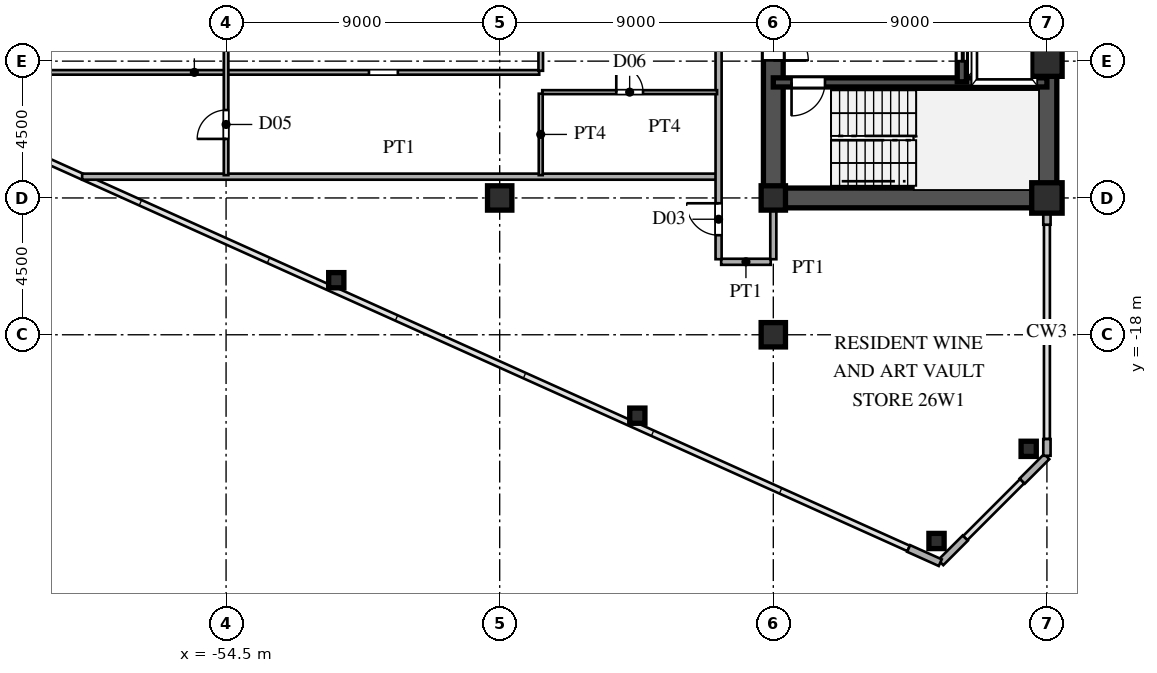
"""IFC4 building model, lengths in metres.
Left out: names, types, materials, properties, quantities, classifications, styles, units other than length and angle.
Written with IfcOpenShell. Run it as: python <this file> out.ifc"""

import sys

from ifc_helpers import new_model, si_unit, direction, frame, frame_2d, origin, origin_2d, place, context, subcontext, project, spatial, rectangle, hollow_rectangle, i_section, extrude, source, transform, mapped, element, fill, save


model = new_model("IFC4")
c1 = context("Model", 3, precision=1e-05, world=origin(), true_north=direction((0.0, 1.0)))
c2 = subcontext(c1, "Body", "Model", "MODEL_VIEW")
j1 = project(units=[si_unit("LENGTHUNIT", "METRE"), si_unit("PLANEANGLEUNIT", "RADIAN")], contexts=[c1])
p1 = place(None, origin())
s1 = spatial("IfcSite", under=j1, at=p1, CompositionType="ELEMENT")
p2 = place(p1, origin())
s2 = spatial("IfcBuilding", under=s1, at=p2, CompositionType="ELEMENT")
p3 = place(p2, frame((0.0, 0.0, 99.6)))
s3 = spatial("IfcBuildingStorey", under=s2, at=p3, CompositionType="ELEMENT", Elevation=99.6)
m1 = source(origin(), c2, "Body", "SweptSolid", [
    extrude(hollow_rectangle(XDim=1.0, YDim=1.0, WallThickness=0.042, at=origin_2d()), origin(), (0.0, 0.0, 1.0), 3.6),
])
for number, where, z_axis, x_axis in (
    (1, (-27.5, -13.5, 0.0), (0.0, 0.0, 1.0), (1.0, 0.0, 0.0)),
    (2, (-27.5, -9.0, 0.0), (0.0, 0.0, 1.0), (1.0, 0.0, 0.0)),
):
    element("IfcColumn", number, at=place(p3, frame(where, z_axis=z_axis, x_axis=x_axis)), inside=s3, PredefinedType="COLUMN", context=c2, shape_type="MappedRepresentation", body=[
        mapped(m1, transform((0.0, 0.0, 0.0), scale=1.0)),
    ])
m2 = source(origin(), c2, "Body", "SweptSolid", [
    extrude(i_section(OverallWidth=0.8, OverallDepth=0.8, WebThickness=0.032, FlangeThickness=0.05, at=origin_2d()), origin(), (0.0, 0.0, 1.0), 3.6),
])
for number, where, z_axis, x_axis in (
    (3, (-36.5, -18.0, 0.0), (0.0, 0.0, 1.0), (1.0, 0.0, 0.0)),
    (4, (-36.5, -13.5, 0.0), (0.0, 0.0, 1.0), (1.0, 0.0, 0.0)),
    (5, (-45.5, -13.5, 0.0), (0.0, 0.0, 1.0), (1.0, 0.0, 0.0)),
):
    element("IfcColumn", number, at=place(p3, frame(where, z_axis=z_axis, x_axis=x_axis)), inside=s3, PredefinedType="COLUMN", context=c2, shape_type="MappedRepresentation", body=[
        mapped(m2, transform((0.0, 0.0, 0.0), scale=1.0)),
    ])
m3 = source(origin(), c2, "Body", "SweptSolid", [
    extrude(hollow_rectangle(XDim=0.5, YDim=0.5, WallThickness=0.02, at=origin_2d()), origin(), (0.0, 0.0, 1.0), 3.6),
])
for number, where, z_axis, x_axis in (
    (6, (-28.1, -21.751, 0.0), (0.0, 0.0, 1.0), (1.0, 0.0, 0.0)),
    (7, (-31.131, -24.783, 0.0), (0.0, 0.0, 1.0), (1.0, 0.0, 0.0)),
    (8, (-40.973, -20.661, 0.0), (0.0, 0.0, 1.0), (1.0, 0.0, 0.0)),
    (9, (-50.875, -16.205, 0.0), (0.0, 0.0, 1.0), (1.0, 0.0, 0.0)),
):
    element("IfcColumn", number, at=place(p3, frame(where, z_axis=z_axis, x_axis=x_axis)), inside=s3, PredefinedType="COLUMN", context=c2, shape_type="MappedRepresentation", body=[
        mapped(m3, transform((0.0, 0.0, 0.0), scale=1.0)),
    ])
p4 = place(p3, frame((-27.5, -21.98, 0.0), z_axis=(0.0, 0.0, 1.0), x_axis=(0.0, 1.0, 0.0)))
e10 = element("IfcWall", 10, at=p4, inside=s3, PredefinedType="SOLIDWALL", context=c2, shape_type="SweptSolid", body=[
    extrude(rectangle(XDim=0.55, YDim=0.24, at=frame_2d((0.275, 0.0))), origin(), (0.0, 0.0, 1.0), 3.38),
])
p5 = place(p3, frame((-27.5, -14.38, 0.0), z_axis=(0.0, 0.0, 1.0), x_axis=(0.0, 1.0, 0.0)))
e11 = element("IfcWall", 11, at=p5, inside=s3, PredefinedType="SOLIDWALL", context=c2, shape_type="SweptSolid", body=[
    extrude(rectangle(XDim=0.55, YDim=0.24, at=frame_2d((0.275, 0.0))), origin(), (0.0, 0.0, 1.0), 2.88),
])
p6 = place(p3, frame((-32.049, -25.028, 0.0), z_axis=(0.0, 0.0, 1.0), x_axis=(0.911929519623, -0.410346866979, 0.0)))
e12 = element("IfcWall", 12, at=p6, inside=s3, PredefinedType="SOLIDWALL", context=c2, shape_type="SweptSolid", body=[
    extrude(rectangle(XDim=1.14, YDim=0.24, at=frame_2d((0.57, 0.0))), origin(), (0.0, 0.0, 1.0), 3.38),
])
for number, where, z_axis, x_axis in (
    (13, (-30.993, -25.493, 0.0), (0.0, 0.0, 1.0), (0.707, 0.707, 0.0)),
    (14, (-28.313, -22.813, 0.0), (0.0, 0.0, 1.0), (0.707, 0.707, 0.0)),
):
    element("IfcWall", number, at=place(p3, frame(where, z_axis=z_axis, x_axis=x_axis)), inside=s3, PredefinedType="SOLIDWALL", context=c2, shape_type="SweptSolid", body=[
        extrude(rectangle(XDim=1.14, YDim=0.24, at=frame_2d((0.57, 0.0))), origin(), (0.0, 0.0, 1.0), 3.38),
    ])
p7 = place(p3, frame((-27.5, -13.5, 0.0), z_axis=(0.0, 0.0, 1.0), x_axis=(0.0, 1.0, 0.0)))
e15 = element("IfcWall", 15, at=p7, inside=s3, PredefinedType="SHEAR", context=c2, shape_type="SweptSolid", body=[
    extrude(rectangle(XDim=12.2, YDim=0.65, at=frame_2d((6.1, 0.0))), origin(), (0.0, 0.0, 1.0), 3.38),
])
p8 = place(p3, frame((-36.5, -13.5, 0.0), z_axis=(0.0, 0.0, 1.0), x_axis=(1.0, 0.0, 0.0)))
e16 = element("IfcWall", 16, at=p8, inside=s3, PredefinedType="SHEAR", context=c2, shape_type="SweptSolid", body=[
    extrude(rectangle(XDim=9.0, YDim=0.65, at=frame_2d((4.5, 0.0))), origin(), (0.0, 0.0, 1.0), 3.38),
])
p9 = place(p3, frame((-36.5, -13.65, 0.0), z_axis=(0.0, 0.0, 1.0), x_axis=(0.0, 1.0, 0.0)))
e17 = element("IfcWall", 17, at=p9, inside=s3, PredefinedType="SHEAR", context=c2, shape_type="SweptSolid", body=[
    extrude(rectangle(XDim=7.15, YDim=0.65, at=frame_2d((3.575, 0.0))), origin(), (0.0, 0.0, 1.0), 3.38),
])
p10 = place(p9, frame((4.675, 0.0, 0.0)))
e18 = element("IfcOpeningElement", 18, at=p10, cuts=e17, PredefinedType="OPENING", context=c2, shape_type="SweptSolid", body=[
    extrude(rectangle(XDim=1.15, YDim=2.2, at=frame_2d((0.575, 1.1))), frame((0.0, 0.335, 0.0), z_axis=(0.0, -1.0, 0.0), x_axis=(1.0, 0.0, 0.0)), (0.0, 0.0, 1.0), 0.67),
])
p11 = place(p3, frame((-36.5, -9.7, 0.0), z_axis=(0.0, 0.0, 1.0), x_axis=(1.0, 0.0, 0.0)))
e19 = element("IfcWall", 19, at=p11, inside=s3, PredefinedType="SHEAR", context=c2, shape_type="SweptSolid", body=[
    extrude(rectangle(XDim=9.0, YDim=0.3, at=frame_2d((4.5, 0.0))), origin(), (0.0, 0.0, 1.0), 3.38),
])
p12 = place(p11, frame((0.6, 0.0, 0.0)))
e20 = element("IfcOpeningElement", 20, at=p12, cuts=e19, PredefinedType="OPENING", context=c2, shape_type="SweptSolid", body=[
    extrude(rectangle(XDim=1.1, YDim=2.2, at=frame_2d((0.55, 1.1))), frame((0.0, 0.16, 0.0), z_axis=(0.0, -1.0, 0.0), x_axis=(1.0, 0.0, 0.0)), (0.0, 0.0, 1.0), 0.32),
])
p13 = place(p3, frame((-30.3, -9.68, 0.0), z_axis=(0.0, 0.0, 1.0), x_axis=(0.0, 1.0, 0.0)))
e21 = element("IfcWall", 21, at=p13, inside=s3, PredefinedType="SHEAR", context=c2, shape_type="SweptSolid", body=[
    extrude(rectangle(XDim=2.56, YDim=0.3, at=frame_2d((1.28, 0.0))), origin(), (0.0, 0.0, 1.0), 3.38),
])
p14 = place(p13, frame((0.68, 0.0, 0.0)))
e22 = element("IfcOpeningElement", 22, at=p14, cuts=e21, PredefinedType="OPENING", context=c2, shape_type="SweptSolid", body=[
    extrude(rectangle(XDim=1.2, YDim=2.25, at=frame_2d((0.6, 1.125))), frame((0.0, 0.16, 0.0), z_axis=(0.0, -1.0, 0.0), x_axis=(1.0, 0.0, 0.0)), (0.0, 0.0, 1.0), 0.32),
])
p15 = place(p3, frame((-38.215, -15.6, 0.0), z_axis=(0.0, 0.0, 1.0), x_axis=(1.0, 0.0, 0.0)))
e23 = element("IfcWall", 23, at=p15, inside=s3, PredefinedType="PARTITIONING", context=c2, shape_type="SweptSolid", body=[
    extrude(rectangle(XDim=1.63, YDim=0.2, at=frame_2d((0.815, 0.0))), origin(), (0.0, 0.0, 1.0), 3.38),
])
p16 = place(p3, frame((-59.234, -12.8, 0.0), z_axis=(0.0, 0.0, 1.0), x_axis=(1.0, 0.0, 0.0)))
e24 = element("IfcWall", 24, at=p16, inside=s3, PredefinedType="PARTITIONING", context=c2, shape_type="SweptSolid", body=[
    extrude(rectangle(XDim=20.854, YDim=0.2, at=frame_2d((10.427, 0.0))), origin(), (0.0, 0.0, 1.0), 3.38),
])
p17 = place(p3, frame((-44.1, -10.02, 0.0), z_axis=(0.0, 0.0, 1.0), x_axis=(1.0, 0.0, 0.0)))
e25 = element("IfcWall", 25, at=p17, inside=s3, PredefinedType="PARTITIONING", context=c2, shape_type="SweptSolid", body=[
    extrude(rectangle(XDim=5.75, YDim=0.13, at=frame_2d((2.875, 0.0))), origin(), (0.0, 0.0, 1.0), 3.38),
])
p18 = place(p17, frame((2.435, 0.0, 0.0)))
e26 = element("IfcOpeningElement", 26, at=p18, cuts=e25, PredefinedType="OPENING", context=c2, shape_type="SweptSolid", body=[
    extrude(rectangle(XDim=0.88, YDim=2.1, at=frame_2d((0.44, 1.05))), frame((0.0, 0.075, 0.0), z_axis=(0.0, -1.0, 0.0), x_axis=(1.0, 0.0, 0.0)), (0.0, 0.0, 1.0), 0.15),
])
p19 = place(p3, frame((-66.887, -9.37, 0.0), z_axis=(0.0, 0.0, 1.0), x_axis=(1.0, 0.0, 0.0)))
e27 = element("IfcWall", 27, at=p19, inside=s3, PredefinedType="PARTITIONING", context=c2, shape_type="SweptSolid", body=[
    extrude(rectangle(XDim=22.687, YDim=0.15, at=frame_2d((11.344, 0.0))), origin(), (0.0, 0.0, 1.0), 3.38),
])
p20 = place(p19, frame((17.087, 0.0, 0.0)))
e28 = element("IfcOpeningElement", 28, at=p20, cuts=e27, PredefinedType="OPENING", context=c2, shape_type="SweptSolid", body=[
    extrude(rectangle(XDim=0.95, YDim=2.15, at=frame_2d((0.475, 1.075))), frame((0.0, 0.085, 0.0), z_axis=(0.0, -1.0, 0.0), x_axis=(1.0, 0.0, 0.0)), (0.0, 0.0, 1.0), 0.17),
])
p21 = place(p3, frame((-54.5, -12.75, 0.0), z_axis=(0.0, 0.0, 1.0), x_axis=(0.0, 1.0, 0.0)))
e29 = element("IfcWall", 29, at=p21, inside=s3, PredefinedType="PARTITIONING", context=c2, shape_type="SweptSolid", body=[
    extrude(rectangle(XDim=27.71, YDim=0.15, at=frame_2d((13.855, 0.0))), origin(), (0.0, 0.0, 1.0), 2.68),
])
p22 = place(p21, frame((4.625, 0.0, 0.0)))
e30 = element("IfcOpeningElement", 30, at=p22, cuts=e29, PredefinedType="OPENING", context=c2, shape_type="SweptSolid", body=[
    extrude(rectangle(XDim=0.95, YDim=2.15, at=frame_2d((0.475, 1.075))), frame((0.0, 0.085, 0.0), z_axis=(0.0, -1.0, 0.0), x_axis=(1.0, 0.0, 0.0)), (0.0, 0.0, 1.0), 0.17),
])
p23 = place(p21, frame((1.192, 0.0, 0.0)))
e31 = element("IfcOpeningElement", 31, at=p23, cuts=e29, PredefinedType="OPENING", context=c2, shape_type="SweptSolid", body=[
    extrude(rectangle(XDim=0.95, YDim=2.15, at=frame_2d((0.475, 1.075))), frame((0.0, 0.085, 0.0), z_axis=(0.0, -1.0, 0.0), x_axis=(1.0, 0.0, 0.0)), (0.0, 0.0, 1.0), 0.17),
])
p24 = place(p21, frame((8.717, 0.0, 0.0)))
e32 = element("IfcOpeningElement", 32, at=p24, cuts=e29, PredefinedType="OPENING", context=c2, shape_type="SweptSolid", body=[
    extrude(rectangle(XDim=0.95, YDim=2.15, at=frame_2d((0.475, 1.075))), frame((0.0, 0.085, 0.0), z_axis=(0.0, -1.0, 0.0), x_axis=(1.0, 0.0, 0.0)), (0.0, 0.0, 1.0), 0.17),
])
p25 = place(p21, frame((15.275, 0.0, 0.0)))
e33 = element("IfcOpeningElement", 33, at=p25, cuts=e29, PredefinedType="OPENING", context=c2, shape_type="SweptSolid", body=[
    extrude(rectangle(XDim=0.95, YDim=2.15, at=frame_2d((0.475, 1.075))), frame((0.0, 0.085, 0.0), z_axis=(0.0, -1.0, 0.0), x_axis=(1.0, 0.0, 0.0)), (0.0, 0.0, 1.0), 0.17),
])
p26 = place(p21, frame((25.835, 0.0, 0.0)))
e34 = element("IfcOpeningElement", 34, at=p26, cuts=e29, PredefinedType="OPENING", context=c2, shape_type="SweptSolid", body=[
    extrude(rectangle(XDim=0.95, YDim=2.15, at=frame_2d((0.475, 1.075))), frame((0.0, 0.085, 0.0), z_axis=(0.0, -1.0, 0.0), x_axis=(1.0, 0.0, 0.0)), (0.0, 0.0, 1.0), 0.17),
])
p27 = place(p3, frame((-44.15, -12.75, 0.0), z_axis=(0.0, 0.0, 1.0), x_axis=(0.0, 1.0, 0.0)))
e35 = element("IfcWall", 35, at=p27, inside=s3, PredefinedType="PARTITIONING", context=c2, shape_type="SweptSolid", body=[
    extrude(rectangle(XDim=2.679, YDim=0.13, at=frame_2d((1.339, 0.0))), origin(), (0.0, 0.0, 1.0), 3.38),
])
p28 = place(p3, frame((-44.15, -9.317, 0.0), z_axis=(0.0, 0.0, 1.0), x_axis=(0.0, 1.0, 0.0)))
e36 = element("IfcWall", 36, at=p28, inside=s3, PredefinedType="PARTITIONING", context=c2, shape_type="SweptSolid", body=[
    extrude(rectangle(XDim=3.334, YDim=0.15, at=frame_2d((1.667, 0.0))), origin(), (0.0, 0.0, 1.0), 3.38),
])
p29 = place(p28, frame((1.192, 0.0, 0.0)))
e37 = element("IfcOpeningElement", 37, at=p29, cuts=e36, PredefinedType="OPENING", context=c2, shape_type="SweptSolid", body=[
    extrude(rectangle(XDim=0.95, YDim=2.15, at=frame_2d((0.475, 1.075))), frame((0.0, 0.085, 0.0), z_axis=(0.0, -1.0, 0.0), x_axis=(1.0, 0.0, 0.0)), (0.0, 0.0, 1.0), 0.17),
])
p30 = place(p3, frame((-38.3, -15.515, 0.0), z_axis=(0.0, 0.0, 1.0), x_axis=(0.0, 1.0, 0.0)))
e38 = element("IfcWall", 38, at=p30, inside=s3, PredefinedType="PARTITIONING", context=c2, shape_type="SweptSolid", body=[
    extrude(rectangle(XDim=31.03, YDim=0.2, at=frame_2d((15.515, 0.0))), origin(), (0.0, 0.0, 1.0), 3.38),
])
p31 = place(p30, frame((0.79, 0.0, 0.0)))
e39 = element("IfcOpeningElement", 39, at=p31, cuts=e38, PredefinedType="OPENING", context=c2, shape_type="SweptSolid", body=[
    extrude(rectangle(XDim=1.05, YDim=2.25, at=frame_2d((0.525, 1.125))), frame((0.0, 0.11, 0.0), z_axis=(0.0, -1.0, 0.0), x_axis=(1.0, 0.0, 0.0)), (0.0, 0.0, 1.0), 0.22),
])
p32 = place(p30, frame((7.186, 0.0, 0.0)))
e40 = element("IfcOpeningElement", 40, at=p32, cuts=e38, PredefinedType="OPENING", context=c2, shape_type="SweptSolid", body=[
    extrude(rectangle(XDim=1.05, YDim=2.25, at=frame_2d((0.525, 1.125))), frame((0.0, 0.11, 0.0), z_axis=(0.0, -1.0, 0.0), x_axis=(1.0, 0.0, 0.0)), (0.0, 0.0, 1.0), 0.22),
])
p33 = place(p30, frame((17.825, 0.0, 0.0)))
e41 = element("IfcOpeningElement", 41, at=p33, cuts=e38, PredefinedType="OPENING", context=c2, shape_type="SweptSolid", body=[
    extrude(rectangle(XDim=1.05, YDim=2.25, at=frame_2d((0.525, 1.125))), frame((0.0, 0.11, 0.0), z_axis=(0.0, -1.0, 0.0), x_axis=(1.0, 0.0, 0.0)), (0.0, 0.0, 1.0), 0.22),
])
p34 = place(p30, frame((27.635, 0.0, 0.0)))
e42 = element("IfcOpeningElement", 42, at=p34, cuts=e38, PredefinedType="OPENING", context=c2, shape_type="SweptSolid", body=[
    extrude(rectangle(XDim=1.05, YDim=2.25, at=frame_2d((0.525, 1.125))), frame((0.0, 0.11, 0.0), z_axis=(0.0, -1.0, 0.0), x_axis=(1.0, 0.0, 0.0)), (0.0, 0.0, 1.0), 0.22),
])
p35 = place(p3, frame((-36.5, -15.515, 0.0), z_axis=(0.0, 0.0, 1.0), x_axis=(0.0, 1.0, 0.0)))
e43 = element("IfcWall", 43, at=p35, inside=s3, PredefinedType="PARTITIONING", context=c2, shape_type="SweptSolid", body=[
    extrude(rectangle(XDim=1.685, YDim=0.2, at=frame_2d((0.842, 0.0))), origin(), (0.0, 0.0, 1.0), 2.68),
])
m4 = source(origin(), c2, "Body", "SweptSolid", [
    extrude(rectangle(XDim=1.15, YDim=2.2, at=frame_2d((0.575, 1.1))), frame((0.0, 0.025, 0.0), z_axis=(0.0, -1.0, 0.0), x_axis=(1.0, 0.0, 0.0)), (0.0, 0.0, 1.0), 0.05),
])
p36 = place(p10, frame((1.15, 0.0, 0.0), z_axis=(0.0, 0.0, 1.0), x_axis=(-1.0, 0.0, 0.0)))
e44 = element("IfcDoor", 44, at=p36, inside=s3, OperationType="SINGLE_SWING_LEFT", PredefinedType="DOOR", context=c2, shape_type="MappedRepresentation", body=[
    mapped(m4, transform((0.0, 0.0, 0.0), scale=1.0)),
])
fill(e18, e44)
m5 = source(origin(), c2, "Body", "SweptSolid", [
    extrude(rectangle(XDim=1.1, YDim=2.2, at=frame_2d((0.55, 1.1))), frame((0.0, 0.025, 0.0), z_axis=(0.0, -1.0, 0.0), x_axis=(1.0, 0.0, 0.0)), (0.0, 0.0, 1.0), 0.05),
])
p37 = place(p12, frame((1.1, 0.0, 0.0), z_axis=(0.0, 0.0, 1.0), x_axis=(-1.0, 0.0, 0.0)))
e45 = element("IfcDoor", 45, at=p37, inside=s3, OperationType="SINGLE_SWING_LEFT", PredefinedType="DOOR", context=c2, shape_type="MappedRepresentation", body=[
    mapped(m5, transform((0.0, 0.0, 0.0), scale=1.0)),
])
fill(e20, e45)
m6 = source(origin(), c2, "Body", "SweptSolid", [
    extrude(rectangle(XDim=1.2, YDim=2.25, at=frame_2d((0.6, 1.125))), frame((0.0, 0.025, 0.0), z_axis=(0.0, -1.0, 0.0), x_axis=(1.0, 0.0, 0.0)), (0.0, 0.0, 1.0), 0.05),
])
p38 = place(p14, origin())
e46 = element("IfcDoor", 46, at=p38, inside=s3, OperationType="DOUBLE_DOOR_SLIDING", PredefinedType="DOOR", context=c2, shape_type="MappedRepresentation", body=[
    mapped(m6, transform((0.0, 0.0, 0.0), scale=1.0)),
])
fill(e22, e46)
m7 = source(origin(), c2, "Body", "SweptSolid", [
    extrude(rectangle(XDim=0.88, YDim=2.1, at=frame_2d((0.44, 1.05))), frame((0.0, 0.025, 0.0), z_axis=(0.0, -1.0, 0.0), x_axis=(1.0, 0.0, 0.0)), (0.0, 0.0, 1.0), 0.05),
])
p39 = place(p18, origin())
e47 = element("IfcDoor", 47, at=p39, inside=s3, OperationType="SINGLE_SWING_LEFT", PredefinedType="DOOR", context=c2, shape_type="MappedRepresentation", body=[
    mapped(m7, transform((0.0, 0.0, 0.0), scale=1.0)),
])
fill(e26, e47)
m8 = source(origin(), c2, "Body", "SweptSolid", [
    extrude(rectangle(XDim=0.95, YDim=2.15, at=frame_2d((0.475, 1.075))), frame((0.0, 0.025, 0.0), z_axis=(0.0, -1.0, 0.0), x_axis=(1.0, 0.0, 0.0)), (0.0, 0.0, 1.0), 0.05),
])
p40 = place(p23, origin())
e48 = element("IfcDoor", 48, at=p40, inside=s3, OperationType="SINGLE_SWING_LEFT", PredefinedType="DOOR", context=c2, shape_type="MappedRepresentation", body=[
    mapped(m8, transform((0.0, 0.0, 0.0), scale=1.0)),
])
fill(e31, e48)
m9 = source(origin(), c2, "Body", "SweptSolid", [
    extrude(rectangle(XDim=1.05, YDim=2.25, at=frame_2d((0.525, 1.125))), frame((0.0, 0.025, 0.0), z_axis=(0.0, -1.0, 0.0), x_axis=(1.0, 0.0, 0.0)), (0.0, 0.0, 1.0), 0.05),
])
p41 = place(p31, origin())
e49 = element("IfcDoor", 49, at=p41, inside=s3, OperationType="SINGLE_SWING_RIGHT", PredefinedType="DOOR", context=c2, shape_type="MappedRepresentation", body=[
    mapped(m9, transform((0.0, 0.0, 0.0), scale=1.0)),
])
fill(e39, e49)
save(model, sys.argv[1])
